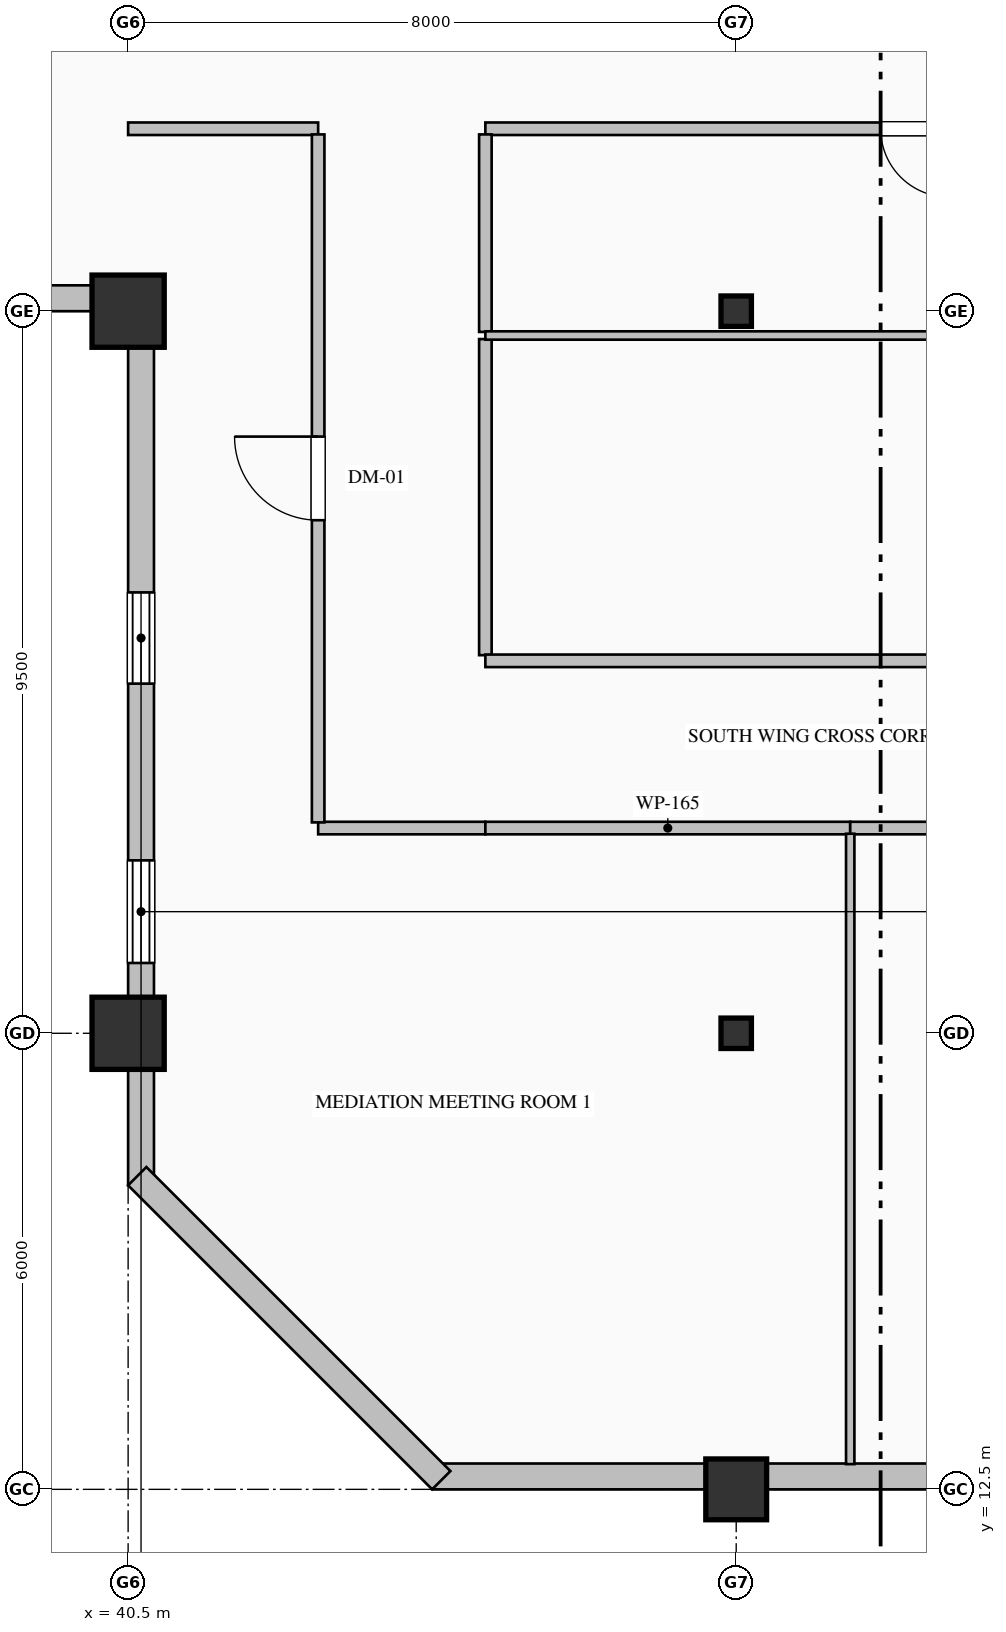
"""IFC4 building model, lengths in metres.
Left out: names, types, materials, properties, quantities, classifications, styles, units other than length and angle.
Written with IfcOpenShell. Run it as: python <this file> out.ifc"""

import sys

from ifc_helpers import new_model, si_unit, direction, frame, frame_2d, origin, origin_2d, place, context, subcontext, project, spatial, rectangle, hollow_rectangle, i_section, extrude, element, fill, save


model = new_model("IFC4")
c1 = context("Model", 3, precision=1e-05, world=origin(), true_north=direction((0.0, 1.0)))
c2 = subcontext(c1, "Body", "Model", "MODEL_VIEW")
j1 = project(units=[si_unit("LENGTHUNIT", "METRE"), si_unit("PLANEANGLEUNIT", "RADIAN")], contexts=[c1])
p1 = place(None, origin())
s1 = spatial("IfcSite", under=j1, at=p1, CompositionType="ELEMENT")
p2 = place(p1, origin())
s2 = spatial("IfcBuilding", under=s1, at=p2, CompositionType="ELEMENT")
p3 = place(p2, frame((0.0, 0.0, 277.8)))
s3 = spatial("IfcBuildingStorey", under=s2, at=p3, CompositionType="ELEMENT", Elevation=277.8)
for number, where, z_axis, x_axis in (
    (1, (40.5, 18.5, 0.0), (0.0, 0.0, 1.0), (1.0, 0.0, 0.0)),
    (2, (40.5, 28.0, 0.0), (0.0, 0.0, 1.0), (1.0, 0.0, 0.0)),
):
    element("IfcColumn", number, at=place(p3, frame(where, z_axis=z_axis, x_axis=x_axis)), inside=s3, PredefinedType="COLUMN", context=c2, shape_type="SweptSolid", body=[
        extrude(hollow_rectangle(XDim=0.95, YDim=0.95, WallThickness=0.036, at=origin_2d()), origin(), (0.0, 0.0, 1.0), 4.0),
    ])
p4 = place(p3, frame((48.5, 12.5, 0.0), z_axis=(0.0, 0.0, 1.0), x_axis=(1.0, 0.0, 0.0)))
e3 = element("IfcColumn", 3, at=p4, inside=s3, PredefinedType="COLUMN", context=c2, shape_type="SweptSolid", body=[
    extrude(hollow_rectangle(XDim=0.8, YDim=0.8, WallThickness=0.032, at=origin_2d()), origin(), (0.0, 0.0, 1.0), 4.0),
])
for number, where, z_axis, x_axis in (
    (4, (48.5, 18.5, 0.0), (0.0, 0.0, 1.0), (1.0, 0.0, 0.0)),
    (5, (48.5, 28.0, 0.0), (0.0, 0.0, 1.0), (1.0, 0.0, 0.0)),
):
    element("IfcColumn", number, at=place(p3, frame(where, z_axis=z_axis, x_axis=x_axis)), inside=s3, PredefinedType="COLUMN", context=c2, shape_type="SweptSolid", body=[
        extrude(i_section(OverallWidth=0.4, OverallDepth=0.4, WebThickness=0.013, FlangeThickness=0.021, FilletRadius=0.022, at=origin_2d()), origin(), (0.0, 0.0, 1.0), 4.0),
    ])
p5 = place(p3, frame((40.67, 16.5, 0.0), z_axis=(0.0, 0.0, 1.0), x_axis=(0.0, 1.0, 0.0)))
e6 = element("IfcWall", 6, at=p5, inside=s3, PredefinedType="SOLIDWALL", context=c2, shape_type="SweptSolid", body=[
    extrude(rectangle(XDim=11.84, YDim=0.34, at=frame_2d((5.92, 0.0))), origin(), (0.0, 0.0, 1.0), 3.062),
])
p6 = place(p5, frame((2.925, 0.0, 0.9)))
e7 = element("IfcOpeningElement", 7, at=p6, cuts=e6, PredefinedType="OPENING", context=c2, shape_type="SweptSolid", body=[
    extrude(rectangle(XDim=1.35, YDim=1.85, at=frame_2d((0.675, 0.925))), frame((0.0, 0.18, 0.0), z_axis=(0.0, -1.0, 0.0), x_axis=(1.0, 0.0, 0.0)), (0.0, 0.0, 1.0), 0.36),
])
p7 = place(p5, frame((6.6, 0.0, 0.7)))
e8 = element("IfcOpeningElement", 8, at=p7, cuts=e6, PredefinedType="OPENING", context=c2, shape_type="SweptSolid", body=[
    extrude(rectangle(XDim=1.2, YDim=1.85, at=frame_2d((0.6, 0.925))), frame((0.0, 0.18, 0.0), z_axis=(0.0, -1.0, 0.0), x_axis=(1.0, 0.0, 0.0)), (0.0, 0.0, 1.0), 0.36),
])
p8 = place(p3, frame((40.52, 28.17, 0.0), z_axis=(0.0, 0.0, 1.0), x_axis=(-1.0, 0.0, 0.0)))
e9 = element("IfcWall", 9, at=p8, inside=s3, PredefinedType="SOLIDWALL", context=c2, shape_type="SweptSolid", body=[
    extrude(rectangle(XDim=27.52, YDim=0.34, at=frame_2d((13.76, 0.0))), origin(), (0.0, 0.0, 1.0), 3.062),
])
p9 = place(p8, frame((10.125, 0.0, 0.9)))
e10 = element("IfcOpeningElement", 10, at=p9, cuts=e9, PredefinedType="OPENING", context=c2, shape_type="SweptSolid", body=[
    extrude(rectangle(XDim=1.35, YDim=1.85, at=frame_2d((0.675, 0.925))), frame((0.0, 0.18, 0.0), z_axis=(0.0, -1.0, 0.0), x_axis=(1.0, 0.0, 0.0)), (0.0, 0.0, 1.0), 0.36),
])
p10 = place(p8, frame((13.8, 0.0, 0.7)))
e11 = element("IfcOpeningElement", 11, at=p10, cuts=e9, PredefinedType="OPENING", context=c2, shape_type="SweptSolid", body=[
    extrude(rectangle(XDim=1.2, YDim=1.85, at=frame_2d((0.6, 0.925))), frame((0.0, 0.18, 0.0), z_axis=(0.0, -1.0, 0.0), x_axis=(1.0, 0.0, 0.0)), (0.0, 0.0, 1.0), 0.36),
])
p11 = place(p8, frame((17.4, 0.0, 0.9)))
e12 = element("IfcOpeningElement", 12, at=p11, cuts=e9, PredefinedType="OPENING", context=c2, shape_type="SweptSolid", body=[
    extrude(rectangle(XDim=1.2, YDim=1.85, at=frame_2d((0.6, 0.925))), frame((0.0, 0.18, 0.0), z_axis=(0.0, -1.0, 0.0), x_axis=(1.0, 0.0, 0.0)), (0.0, 0.0, 1.0), 0.36),
])
p12 = place(p8, frame((20.925, 0.0, 0.9)))
e13 = element("IfcOpeningElement", 13, at=p12, cuts=e9, PredefinedType="OPENING", context=c2, shape_type="SweptSolid", body=[
    extrude(rectangle(XDim=1.35, YDim=1.85, at=frame_2d((0.675, 0.925))), frame((0.0, 0.18, 0.0), z_axis=(0.0, -1.0, 0.0), x_axis=(1.0, 0.0, 0.0)), (0.0, 0.0, 1.0), 0.36),
])
p13 = place(p3, frame((60.0, 12.67, 0.0), z_axis=(0.0, 0.0, 1.0), x_axis=(-1.0, 0.0, 0.0)))
e14 = element("IfcWall", 14, at=p13, inside=s3, PredefinedType="SOLIDWALL", context=c2, shape_type="SweptSolid", body=[
    extrude(rectangle(XDim=15.5, YDim=0.34, at=frame_2d((7.75, 0.0))), origin(), (0.0, 0.0, 1.0), 3.2),
])
p14 = place(p13, frame((6.525, 0.0, 0.9)))
e15 = element("IfcOpeningElement", 15, at=p14, cuts=e14, PredefinedType="OPENING", context=c2, shape_type="SweptSolid", body=[
    extrude(rectangle(XDim=1.35, YDim=1.85, at=frame_2d((0.675, 0.925))), frame((0.0, 0.18, 0.0), z_axis=(0.0, -1.0, 0.0), x_axis=(1.0, 0.0, 0.0)), (0.0, 0.0, 1.0), 0.36),
])
p15 = place(p3, frame((44.62, 12.62, 0.0), z_axis=(0.0, 0.0, 1.0), x_axis=(-0.707106781187, 0.707106781187, 0.0)))
e16 = element("IfcWall", 16, at=p15, inside=s3, PredefinedType="SOLIDWALL", context=c2, shape_type="SweptSolid", body=[
    extrude(rectangle(XDim=5.657, YDim=0.34, at=frame_2d((2.828, 0.0))), origin(), (0.0, 0.0, 1.0), 3.65),
])
p16 = place(p3, frame((56.5, 30.4, 0.0), z_axis=(0.0, 0.0, 1.0), x_axis=(-1.0, 0.0, 0.0)))
e17 = element("IfcWall", 17, at=p16, inside=s3, PredefinedType="PARTITIONING", context=c2, shape_type="SweptSolid", body=[
    extrude(rectangle(XDim=11.3, YDim=0.165, at=frame_2d((5.65, 0.0))), origin(), (0.0, 0.0, 1.0), 3.65),
])
p17 = place(p16, frame((5.2, 0.0, 0.0)))
e18 = element("IfcOpeningElement", 18, at=p17, cuts=e17, PredefinedType="OPENING", context=c2, shape_type="SweptSolid", body=[
    extrude(rectangle(XDim=0.9, YDim=2.15, at=frame_2d((0.45, 1.075))), frame((0.0, 0.093, 0.0), z_axis=(0.0, -1.0, 0.0), x_axis=(1.0, 0.0, 0.0)), (0.0, 0.0, 1.0), 0.185),
])
p18 = place(p3, frame((43.0, 30.4, 0.0), z_axis=(0.0, 0.0, 1.0), x_axis=(-1.0, 0.0, 0.0)))
e19 = element("IfcWall", 19, at=p18, inside=s3, PredefinedType="PARTITIONING", context=c2, shape_type="SweptSolid", body=[
    extrude(rectangle(XDim=2.5, YDim=0.165, at=frame_2d((1.25, 0.0))), origin(), (0.0, 0.0, 1.0), 3.65),
])
p19 = place(p3, frame((45.2, 27.633, 0.0), z_axis=(0.0, 0.0, 1.0), x_axis=(0.0, -1.0, 0.0)))
e20 = element("IfcWall", 20, at=p19, inside=s3, PredefinedType="PARTITIONING", context=c2, shape_type="SweptSolid", body=[
    extrude(rectangle(XDim=4.158, YDim=0.165, at=frame_2d((2.079, 0.0))), origin(), (0.0, 0.0, 1.0), 3.65),
])
p20 = place(p3, frame((45.2, 30.325, 0.0), z_axis=(0.0, 0.0, 1.0), x_axis=(0.0, -1.0, 0.0)))
e21 = element("IfcWall", 21, at=p20, inside=s3, PredefinedType="PARTITIONING", context=c2, shape_type="SweptSolid", body=[
    extrude(rectangle(XDim=2.598, YDim=0.165, at=frame_2d((1.299, 0.0))), origin(), (0.0, 0.0, 1.0), 3.65),
])
p21 = place(p3, frame((45.2, 21.2, 0.0), z_axis=(0.0, 0.0, 1.0), x_axis=(-1.0, 0.0, 0.0)))
e22 = element("IfcWall", 22, at=p21, inside=s3, PredefinedType="PARTITIONING", context=c2, shape_type="SweptSolid", body=[
    extrude(rectangle(XDim=2.2, YDim=0.165, at=frame_2d((1.1, 0.0))), origin(), (0.0, 0.0, 1.0), 3.65),
])
p22 = place(p3, frame((43.0, 21.274, 0.0), z_axis=(0.0, 0.0, 1.0), x_axis=(0.0, 1.0, 0.0)))
e23 = element("IfcWall", 23, at=p22, inside=s3, PredefinedType="PARTITIONING", context=c2, shape_type="SweptSolid", body=[
    extrude(rectangle(XDim=9.051, YDim=0.165, at=frame_2d((4.525, 0.0))), origin(), (0.0, 0.0, 1.0), 3.65),
])
p23 = place(p22, frame((3.976, 0.0, 0.0)))
e24 = element("IfcOpeningElement", 24, at=p23, cuts=e23, PredefinedType="OPENING", context=c2, shape_type="SweptSolid", body=[
    extrude(rectangle(XDim=1.1, YDim=2.2, at=frame_2d((0.55, 1.1))), frame((0.0, 0.093, 0.0), z_axis=(0.0, -1.0, 0.0), x_axis=(1.0, 0.0, 0.0)), (0.0, 0.0, 1.0), 0.185),
])
p24 = place(p3, frame((45.2, 23.4, 0.0), z_axis=(0.0, 0.0, 1.0), x_axis=(1.0, 0.0, 0.0)))
e25 = element("IfcWall", 25, at=p24, inside=s3, PredefinedType="PARTITIONING", context=c2, shape_type="SweptSolid", body=[
    extrude(rectangle(XDim=12.8, YDim=0.165, at=frame_2d((6.4, 0.0))), origin(), (0.0, 0.0, 1.0), 3.342),
])
p25 = place(p24, frame((5.95, 0.0, 0.0)))
e26 = element("IfcOpeningElement", 26, at=p25, cuts=e25, PredefinedType="OPENING", context=c2, shape_type="SweptSolid", body=[
    extrude(rectangle(XDim=0.9, YDim=2.15, at=frame_2d((0.45, 1.075))), frame((0.0, 0.093, 0.0), z_axis=(0.0, -1.0, 0.0), x_axis=(1.0, 0.0, 0.0)), (0.0, 0.0, 1.0), 0.185),
])
p26 = place(p3, frame((50.0, 21.2, 0.0), z_axis=(0.0, 0.0, 1.0), x_axis=(-1.0, 0.0, 0.0)))
e27 = element("IfcWall", 27, at=p26, inside=s3, PredefinedType="PARTITIONING", context=c2, shape_type="SweptSolid", body=[
    extrude(rectangle(XDim=4.8, YDim=0.165, at=frame_2d((2.4, 0.0))), origin(), (0.0, 0.0, 1.0), 3.65),
])
p27 = place(p3, frame((57.0, 21.2, 0.0), z_axis=(0.0, 0.0, 1.0), x_axis=(-1.0, 0.0, 0.0)))
e28 = element("IfcWall", 28, at=p27, inside=s3, PredefinedType="PARTITIONING", context=c2, shape_type="SweptSolid", body=[
    extrude(rectangle(XDim=7.0, YDim=0.165, at=frame_2d((3.5, 0.0))), origin(), (0.0, 0.0, 1.0), 3.65),
])
p28 = place(p27, frame((3.05, 0.0, 0.0)))
e29 = element("IfcOpeningElement", 29, at=p28, cuts=e28, PredefinedType="OPENING", context=c2, shape_type="SweptSolid", body=[
    extrude(rectangle(XDim=0.9, YDim=2.15, at=frame_2d((0.45, 1.075))), frame((0.0, 0.093, 0.0), z_axis=(0.0, -1.0, 0.0), x_axis=(1.0, 0.0, 0.0)), (0.0, 0.0, 1.0), 0.185),
])
p29 = place(p3, frame((45.2, 27.68, 0.0), z_axis=(0.0, 0.0, 1.0), x_axis=(1.0, 0.0, 0.0)))
e30 = element("IfcWall", 30, at=p29, inside=s3, PredefinedType="MOVABLE", context=c2, shape_type="SweptSolid", body=[
    extrude(rectangle(XDim=18.468, YDim=0.11, at=frame_2d((9.234, 0.0))), origin(), (0.0, 0.0, 1.0), 3.65),
])
p30 = place(p3, frame((50.0, 21.125, 0.0), z_axis=(0.0, 0.0, 1.0), x_axis=(0.0, -1.0, 0.0)))
e31 = element("IfcWall", 31, at=p30, inside=s3, PredefinedType="MOVABLE", context=c2, shape_type="SweptSolid", body=[
    extrude(rectangle(XDim=8.293, YDim=0.11, at=frame_2d((4.147, 0.0))), origin(), (0.0, 0.0, 1.0), 3.65),
])
p31 = place(p6, origin())
e32 = element("IfcWindow", 32, at=p31, inside=s3, PartitioningType="DOUBLE_PANEL_VERTICAL", PredefinedType="WINDOW", context=c2, shape_type="SweptSolid", body=[
    extrude(rectangle(XDim=1.35, YDim=1.85, at=frame_2d((0.675, 0.925))), frame((0.0, 0.15, 0.0), z_axis=(0.0, -1.0, 0.0), x_axis=(1.0, 0.0, 0.0)), (0.0, 0.0, 1.0), 0.06),
])
fill(e7, e32)
p32 = place(p7, origin())
e33 = element("IfcWindow", 33, at=p32, inside=s3, PartitioningType="DOUBLE_PANEL_VERTICAL", PredefinedType="WINDOW", context=c2, shape_type="SweptSolid", body=[
    extrude(rectangle(XDim=1.2, YDim=1.85, at=frame_2d((0.6, 0.925))), frame((0.0, 0.15, 0.0), z_axis=(0.0, -1.0, 0.0), x_axis=(1.0, 0.0, 0.0)), (0.0, 0.0, 1.0), 0.06),
])
fill(e8, e33)
p33 = place(p17, origin())
e34 = element("IfcDoor", 34, at=p33, inside=s3, OperationType="SINGLE_SWING_LEFT", PredefinedType="DOOR", context=c2, shape_type="SweptSolid", body=[
    extrude(rectangle(XDim=0.9, YDim=2.15, at=frame_2d((0.45, 1.075))), frame((0.0, 0.025, 0.0), z_axis=(0.0, -1.0, 0.0), x_axis=(1.0, 0.0, 0.0)), (0.0, 0.0, 1.0), 0.05),
])
fill(e18, e34)
p34 = place(p23, origin())
e35 = element("IfcDoor", 35, at=p34, inside=s3, OperationType="SINGLE_SWING_RIGHT", PredefinedType="DOOR", context=c2, shape_type="SweptSolid", body=[
    extrude(rectangle(XDim=1.1, YDim=2.2, at=frame_2d((0.55, 1.1))), frame((0.0, 0.025, 0.0), z_axis=(0.0, -1.0, 0.0), x_axis=(1.0, 0.0, 0.0)), (0.0, 0.0, 1.0), 0.05),
])
fill(e24, e35)
save(model, sys.argv[1])
